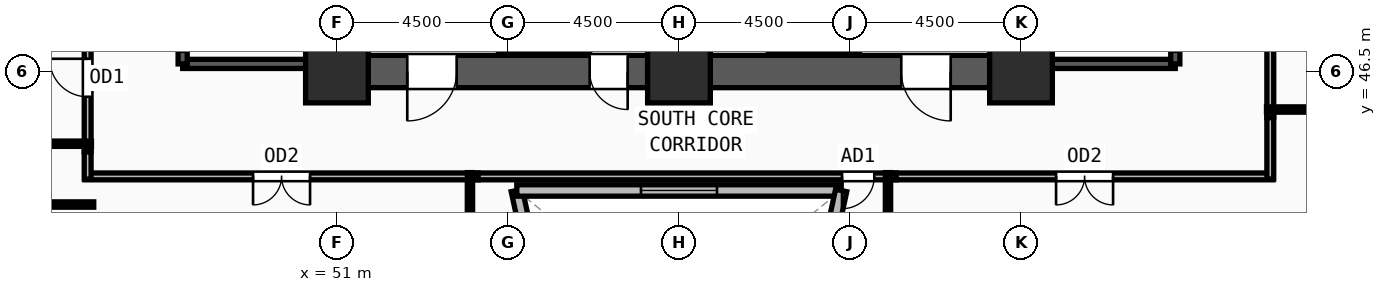
"""IFC4 building model, lengths in metres.
Left out: names, types, materials, properties, quantities, classifications, styles, units other than length and angle.
Written with IfcOpenShell. Run it as: python <this file> out.ifc"""

import sys

from ifc_helpers import new_model, si_unit, direction, frame, frame_2d, origin, origin_2d, place, context, subcontext, project, spatial, rectangle, extrude, source, transform, mapped, element, fill, save


model = new_model("IFC4")
c1 = context("Model", 3, precision=1e-05, world=origin(), true_north=direction((0.0, 1.0)))
c2 = subcontext(c1, "Body", "Model", "MODEL_VIEW")
j1 = project(units=[si_unit("LENGTHUNIT", "METRE"), si_unit("PLANEANGLEUNIT", "RADIAN")], contexts=[c1])
p1 = place(None, origin())
s1 = spatial("IfcSite", under=j1, at=p1, CompositionType="ELEMENT")
p2 = place(p1, origin())
s2 = spatial("IfcBuilding", under=s1, at=p2, CompositionType="ELEMENT")
p3 = place(p2, frame((0.0, 0.0, 74.25)))
s3 = spatial("IfcBuildingStorey", under=s2, at=p3, CompositionType="ELEMENT", Elevation=74.25)
m1 = source(origin(), c2, "Body", "SweptSolid", [
    extrude(rectangle(XDim=1.65, YDim=1.65, at=origin_2d()), origin(), (0.0, 0.0, 1.0), 3.75),
])
for number, where, z_axis, x_axis in (
    (1, (51.0, 46.5, 0.0), (0.0, 0.0, 1.0), (1.0, 0.0, 0.0)),
    (2, (60.0, 46.5, 0.0), (0.0, 0.0, 1.0), (1.0, 0.0, 0.0)),
    (3, (69.0, 46.5, 0.0), (0.0, 0.0, 1.0), (1.0, 0.0, 0.0)),
):
    element("IfcColumn", number, at=place(p3, frame(where, z_axis=z_axis, x_axis=x_axis)), inside=s3, PredefinedType="COLUMN", context=c2, shape_type="MappedRepresentation", body=[
        mapped(m1, transform((0.0, 0.0, 0.0), x_axis=(1.0, 0.0, 0.0), y_axis=(0.0, 1.0, 0.0), z_axis=(0.0, 0.0, 1.0), scale=1.0)),
    ])
p4 = place(p3, frame((68.175, 46.5, 0.0), z_axis=(0.0, 0.0, 1.0), x_axis=(-1.0, 0.0, 0.0)))
e4 = element("IfcWall", 4, at=p4, inside=s3, PredefinedType="SHEAR", context=c2, shape_type="SweptSolid", body=[
    extrude(rectangle(XDim=7.35, YDim=0.85, at=frame_2d((3.675, 0.0))), origin(), (0.0, 0.0, 1.0), 3.57),
])
m2 = source(origin(), c2, "Body", "SweptSolid", [
    extrude(rectangle(XDim=1.3, YDim=2.2, at=frame_2d((0.65, 1.1))), frame((0.0, 0.435, 0.0), z_axis=(0.0, -1.0, 0.0), x_axis=(1.0, 0.0, 0.0)), (0.0, 0.0, 1.0), 0.87),
])
p5 = place(p4, frame((1.025, 0.0, 0.0)))
e5 = element("IfcOpeningElement", 5, at=p5, cuts=e4, PredefinedType="OPENING", context=c2, shape_type="MappedRepresentation", body=[
    mapped(m2, transform((0.0, 0.0, 0.0), x_axis=(1.0, 0.0, 0.0), y_axis=(0.0, 1.0, 0.0), z_axis=(0.0, 0.0, 1.0), scale=1.0)),
])
p6 = place(p3, frame((59.175, 46.5, 0.0), z_axis=(0.0, 0.0, 1.0), x_axis=(-1.0, 0.0, 0.0)))
e6 = element("IfcWall", 6, at=p6, inside=s3, PredefinedType="SHEAR", context=c2, shape_type="SweptSolid", body=[
    extrude(rectangle(XDim=7.35, YDim=0.85, at=frame_2d((3.675, 0.0))), origin(), (0.0, 0.0, 1.0), 3.57),
])
p7 = place(p6, frame((5.025, 0.0, 0.0)))
e7 = element("IfcOpeningElement", 7, at=p7, cuts=e6, PredefinedType="OPENING", context=c2, shape_type="MappedRepresentation", body=[
    mapped(m2, transform((0.0, 0.0, 0.0), x_axis=(1.0, 0.0, 0.0), y_axis=(0.0, 1.0, 0.0), z_axis=(0.0, 0.0, 1.0), scale=1.0)),
])
m3 = source(origin(), c2, "Body", "SweptSolid", [
    extrude(rectangle(XDim=1.0, YDim=2.2, at=frame_2d((0.5, 1.1))), frame((0.0, 0.435, 0.0), z_axis=(0.0, -1.0, 0.0), x_axis=(1.0, 0.0, 0.0)), (0.0, 0.0, 1.0), 0.87),
])
p8 = place(p6, frame((0.525, 0.0, 0.0)))
e8 = element("IfcOpeningElement", 8, at=p8, cuts=e6, PredefinedType="OPENING", context=c2, shape_type="MappedRepresentation", body=[
    mapped(m3, transform((0.0, 0.0, 0.0), x_axis=(1.0, 0.0, 0.0), y_axis=(0.0, 1.0, 0.0), z_axis=(0.0, 0.0, 1.0), scale=1.0)),
])
p9 = place(p3, frame((46.94, 46.7, 0.0), z_axis=(0.0, 0.0, 1.0), x_axis=(1.0, 0.0, 0.0)))
e9 = element("IfcWall", 9, at=p9, inside=s3, PredefinedType="SOLIDWALL", context=c2, shape_type="SweptSolid", body=[
    extrude(rectangle(XDim=3.44, YDim=0.24, at=frame_2d((1.72, 0.0))), origin(), (0.0, 0.0, 1.0), 3.57),
])
p10 = place(p3, frame((50.38, 46.7, 0.0), z_axis=(0.0, 0.0, 1.0), x_axis=(0.0, 1.0, 0.0)))
e10 = element("IfcWall", 10, at=p10, inside=s3, PredefinedType="SOLIDWALL", context=c2, shape_type="SweptSolid", body=[
    extrude(rectangle(XDim=7.82, YDim=0.24, at=frame_2d((3.91, 0.0))), origin(), (0.0, 0.0, 1.0), 3.57),
])
p11 = place(p3, frame((46.94, 54.52, 0.0), z_axis=(0.0, 0.0, 1.0), x_axis=(0.0, -1.0, 0.0)))
e11 = element("IfcWall", 11, at=p11, inside=s3, PredefinedType="SOLIDWALL", context=c2, shape_type="SweptSolid", body=[
    extrude(rectangle(XDim=7.82, YDim=0.24, at=frame_2d((3.91, 0.0))), origin(), (0.0, 0.0, 1.0), 3.57),
])
m4 = source(origin(), c2, "Body", "SweptSolid", [
    extrude(rectangle(XDim=1.2, YDim=2.2, at=frame_2d((0.6, 1.1))), frame((0.0, 0.13, 0.0), z_axis=(0.0, -1.0, 0.0), x_axis=(1.0, 0.0, 0.0)), (0.0, 0.0, 1.0), 0.26),
])
p12 = place(p11, frame((6.3, 0.0, 0.0)))
e12 = element("IfcOpeningElement", 12, at=p12, cuts=e11, PredefinedType="OPENING", context=c2, shape_type="MappedRepresentation", body=[
    mapped(m4, transform((0.0, 0.0, 0.0), x_axis=(1.0, 0.0, 0.0), y_axis=(0.0, 1.0, 0.0), z_axis=(0.0, 0.0, 1.0), scale=1.0)),
])
p13 = place(p3, frame((69.62, 46.7, 0.0), z_axis=(0.0, 0.0, 1.0), x_axis=(1.0, 0.0, 0.0)))
e13 = element("IfcWall", 13, at=p13, inside=s3, PredefinedType="SOLIDWALL", context=c2, shape_type="SweptSolid", body=[
    extrude(rectangle(XDim=3.44, YDim=0.24, at=frame_2d((1.72, 0.0))), origin(), (0.0, 0.0, 1.0), 3.57),
])
p14 = place(p3, frame((73.06, 46.7, 0.0), z_axis=(0.0, 0.0, 1.0), x_axis=(0.0, 1.0, 0.0)))
e14 = element("IfcWall", 14, at=p14, inside=s3, PredefinedType="SOLIDWALL", context=c2, shape_type="SweptSolid", body=[
    extrude(rectangle(XDim=7.82, YDim=0.24, at=frame_2d((3.91, 0.0))), origin(), (0.0, 0.0, 1.0), 3.57),
])
p15 = place(p14, frame((0.32, 0.0, 0.0)))
e15 = element("IfcOpeningElement", 15, at=p15, cuts=e14, PredefinedType="OPENING", context=c2, shape_type="MappedRepresentation", body=[
    mapped(m4, transform((0.0, 0.0, 0.0), x_axis=(1.0, 0.0, 0.0), y_axis=(0.0, 1.0, 0.0), z_axis=(0.0, 0.0, 1.0), scale=1.0)),
])
p16 = place(p3, frame((69.62, 54.52, 0.0), z_axis=(0.0, 0.0, 1.0), x_axis=(0.0, -1.0, 0.0)))
e16 = element("IfcWall", 16, at=p16, inside=s3, PredefinedType="SOLIDWALL", context=c2, shape_type="SweptSolid", body=[
    extrude(rectangle(XDim=7.82, YDim=0.24, at=frame_2d((3.91, 0.0))), origin(), (0.0, 0.0, 1.0), 3.57),
])
p17 = place(p3, frame((57.226, 36.461, 0.0), z_axis=(0.0, 0.0, 1.0), x_axis=(-0.211368462484, 0.977406452336, 0.0)))
e17 = element("IfcWall", 17, at=p17, inside=s3, PredefinedType="SOLIDWALL", context=c2, shape_type="SweptSolid", body=[
    extrude(rectangle(XDim=7.069, YDim=0.3, at=frame_2d((3.534, 0.0))), origin(), (0.0, 0.0, 1.0), 3.57),
])
m5 = source(origin(), c2, "Body", "SweptSolid", [
    extrude(rectangle(XDim=2.0, YDim=1.9, at=frame_2d((1.0, 0.95))), frame((0.0, 0.16, 0.0), z_axis=(0.0, -1.0, 0.0), x_axis=(1.0, 0.0, 0.0)), (0.0, 0.0, 1.0), 0.32),
])
p18 = place(p17, frame((2.534, 0.0, 0.55)))
e18 = element("IfcOpeningElement", 18, at=p18, cuts=e17, PredefinedType="OPENING", context=c2, shape_type="MappedRepresentation", body=[
    mapped(m5, transform((0.0, 0.0, 0.0), x_axis=(1.0, 0.0, 0.0), y_axis=(0.0, 1.0, 0.0), z_axis=(0.0, 0.0, 1.0), scale=1.0)),
])
p19 = place(p3, frame((55.732, 43.37, 0.0), z_axis=(0.0, 0.0, 1.0), x_axis=(1.0, 0.0, 0.0)))
e19 = element("IfcWall", 19, at=p19, inside=s3, PredefinedType="SOLIDWALL", context=c2, shape_type="SweptSolid", body=[
    extrude(rectangle(XDim=8.536, YDim=0.3, at=frame_2d((4.268, 0.0))), origin(), (0.0, 0.0, 1.0), 3.57),
])
p20 = place(p19, frame((3.268, 0.0, 0.55)))
e20 = element("IfcOpeningElement", 20, at=p20, cuts=e19, PredefinedType="OPENING", context=c2, shape_type="MappedRepresentation", body=[
    mapped(m5, transform((0.0, 0.0, 0.0), x_axis=(1.0, 0.0, 0.0), y_axis=(0.0, 1.0, 0.0), z_axis=(0.0, 0.0, 1.0), scale=1.0)),
])
p21 = place(p3, frame((64.268, 43.37, 0.0), z_axis=(0.0, 0.0, 1.0), x_axis=(-0.211368462484, -0.977406452336, 0.0)))
e21 = element("IfcWall", 21, at=p21, inside=s3, PredefinedType="SOLIDWALL", context=c2, shape_type="SweptSolid", body=[
    extrude(rectangle(XDim=7.069, YDim=0.3, at=frame_2d((3.534, 0.0))), origin(), (0.0, 0.0, 1.0), 3.57),
])
p22 = place(p21, frame((2.534, 0.0, 0.55)))
e22 = element("IfcOpeningElement", 22, at=p22, cuts=e21, PredefinedType="OPENING", context=c2, shape_type="MappedRepresentation", body=[
    mapped(m5, transform((0.0, 0.0, 0.0), x_axis=(1.0, 0.0, 0.0), y_axis=(0.0, 1.0, 0.0), z_axis=(0.0, 0.0, 1.0), scale=1.0)),
])
p23 = place(p3, frame((44.44, 44.385, 0.0), z_axis=(0.0, 0.0, 1.0), x_axis=(0.0, 1.0, 0.0)))
e23 = element("IfcWall", 23, at=p23, inside=s3, PredefinedType="PARTITIONING", context=c2, shape_type="SweptSolid", body=[
    extrude(rectangle(XDim=3.9, YDim=0.18, at=frame_2d((1.95, 0.0))), origin(), (0.0, 0.0, 1.0), 3.57),
])
m6 = source(origin(), c2, "Body", "SweptSolid", [
    extrude(rectangle(XDim=1.0, YDim=2.2, at=frame_2d((0.5, 1.1))), frame((0.0, 0.1, 0.0), z_axis=(0.0, -1.0, 0.0), x_axis=(1.0, 0.0, 0.0)), (0.0, 0.0, 1.0), 0.2),
])
p24 = place(p23, frame((1.45, 0.0, 0.0)))
e24 = element("IfcOpeningElement", 24, at=p24, cuts=e23, PredefinedType="OPENING", context=c2, shape_type="MappedRepresentation", body=[
    mapped(m6, transform((0.0, 0.0, 0.0), x_axis=(1.0, 0.0, 0.0), y_axis=(0.0, 1.0, 0.0), z_axis=(0.0, 0.0, 1.0), scale=1.0)),
])
p25 = place(p3, frame((54.715, 43.74, 0.0), z_axis=(0.0, 0.0, 1.0), x_axis=(-1.0, 0.0, 0.0)))
e25 = element("IfcWall", 25, at=p25, inside=s3, PredefinedType="PARTITIONING", context=c2, shape_type="SweptSolid", body=[
    extrude(rectangle(XDim=10.345, YDim=0.18, at=frame_2d((5.172, 0.0))), origin(), (0.0, 0.0, 1.0), 3.57),
])
m7 = source(origin(), c2, "Body", "SweptSolid", [
    extrude(rectangle(XDim=1.5, YDim=2.2, at=frame_2d((0.75, 1.1))), frame((0.0, 0.1, 0.0), z_axis=(0.0, -1.0, 0.0), x_axis=(1.0, 0.0, 0.0)), (0.0, 0.0, 1.0), 0.2),
])
p26 = place(p25, frame((4.423, 0.0, 0.0)))
e26 = element("IfcOpeningElement", 26, at=p26, cuts=e25, PredefinedType="OPENING", context=c2, shape_type="MappedRepresentation", body=[
    mapped(m7, transform((0.0, 0.0, 0.0), x_axis=(1.0, 0.0, 0.0), y_axis=(0.0, 1.0, 0.0), z_axis=(0.0, 0.0, 1.0), scale=1.0)),
])
p27 = place(p3, frame((65.715, 43.74, 0.0), z_axis=(0.0, 0.0, 1.0), x_axis=(-1.0, 0.0, 0.0)))
e27 = element("IfcWall", 27, at=p27, inside=s3, PredefinedType="PARTITIONING", context=c2, shape_type="SweptSolid", body=[
    extrude(rectangle(XDim=11.0, YDim=0.18, at=frame_2d((5.5, 0.0))), origin(), (0.0, 0.0, 1.0), 3.57),
])
m8 = source(origin(), c2, "Body", "SweptSolid", [
    extrude(rectangle(XDim=0.85, YDim=2.1, at=frame_2d((0.425, 1.05))), frame((0.0, 0.1, 0.0), z_axis=(0.0, -1.0, 0.0), x_axis=(1.0, 0.0, 0.0)), (0.0, 0.0, 1.0), 0.2),
])
p28 = place(p27, frame((0.575, 0.0, 0.0)))
e28 = element("IfcOpeningElement", 28, at=p28, cuts=e27, PredefinedType="OPENING", context=c2, shape_type="MappedRepresentation", body=[
    mapped(m8, transform((0.0, 0.0, 0.0), x_axis=(1.0, 0.0, 0.0), y_axis=(0.0, 1.0, 0.0), z_axis=(0.0, 0.0, 1.0), scale=1.0)),
])
p29 = place(p3, frame((75.63, 43.74, 0.0), z_axis=(0.0, 0.0, 1.0), x_axis=(-1.0, 0.0, 0.0)))
e29 = element("IfcWall", 29, at=p29, inside=s3, PredefinedType="PARTITIONING", context=c2, shape_type="SweptSolid", body=[
    extrude(rectangle(XDim=9.915, YDim=0.18, at=frame_2d((4.958, 0.0))), origin(), (0.0, 0.0, 1.0), 3.57),
])
p30 = place(p29, frame((4.207, 0.0, 0.0)))
e30 = element("IfcOpeningElement", 30, at=p30, cuts=e29, PredefinedType="OPENING", context=c2, shape_type="MappedRepresentation", body=[
    mapped(m7, transform((0.0, 0.0, 0.0), x_axis=(1.0, 0.0, 0.0), y_axis=(0.0, 1.0, 0.0), z_axis=(0.0, 0.0, 1.0), scale=1.0)),
])
p31 = place(p3, frame((75.56, 50.785, 0.0), z_axis=(0.0, 0.0, 1.0), x_axis=(0.0, -1.0, 0.0)))
e31 = element("IfcWall", 31, at=p31, inside=s3, PredefinedType="PARTITIONING", context=c2, shape_type="SweptSolid", body=[
    extrude(rectangle(XDim=5.5, YDim=0.18, at=frame_2d((2.75, 0.0))), origin(), (0.0, 0.0, 1.0), 3.57),
])
p32 = place(p31, frame((2.25, 0.0, 0.0)))
e32 = element("IfcOpeningElement", 32, at=p32, cuts=e31, PredefinedType="OPENING", context=c2, shape_type="MappedRepresentation", body=[
    mapped(m6, transform((0.0, 0.0, 0.0), x_axis=(1.0, 0.0, 0.0), y_axis=(0.0, 1.0, 0.0), z_axis=(0.0, 0.0, 1.0), scale=1.0)),
])
p33 = place(p3, frame((44.44, 43.67, 0.0), z_axis=(0.0, 0.0, 1.0), x_axis=(0.0, 1.0, 0.0)))
e33 = element("IfcWall", 33, at=p33, inside=s3, PredefinedType="PARTITIONING", context=c2, shape_type="SweptSolid", body=[
    extrude(rectangle(XDim=0.715, YDim=0.18, at=frame_2d((0.357, 0.0))), origin(), (0.0, 0.0, 1.0), 3.57),
])
p34 = place(p3, frame((75.56, 45.285, 0.0), z_axis=(0.0, 0.0, 1.0), x_axis=(0.0, -1.0, 0.0)))
e34 = element("IfcWall", 34, at=p34, inside=s3, PredefinedType="PARTITIONING", context=c2, shape_type="SweptSolid", body=[
    extrude(rectangle(XDim=1.615, YDim=0.18, at=frame_2d((0.808, 0.0))), origin(), (0.0, 0.0, 1.0), 3.57),
])
p35 = place(p3, frame((44.6, 43.0, 0.0), z_axis=(0.0, 0.0, 1.0), x_axis=(-1.0, 0.0, 0.0)))
e35 = element("IfcWall", 35, at=p35, inside=s3, PredefinedType="PARTITIONING", context=c2, shape_type="SweptSolid", body=[
    extrude(rectangle(XDim=10.232, YDim=0.14, at=frame_2d((5.116, 0.0))), origin(), (0.0, 0.0, 1.0), 3.57),
])
p36 = place(p3, frame((44.54, 44.6, 0.0), z_axis=(0.0, 0.0, 1.0), x_axis=(-1.0, 0.0, 0.0)))
e36 = element("IfcWall", 36, at=p36, inside=s3, PredefinedType="PARTITIONING", context=c2, shape_type="SweptSolid", body=[
    extrude(rectangle(XDim=10.979, YDim=0.14, at=frame_2d((5.49, 0.0))), origin(), (0.0, 0.0, 1.0), 3.57),
])
p37 = place(p3, frame((75.46, 45.5, 0.0), z_axis=(0.0, 0.0, 1.0), x_axis=(1.0, 0.0, 0.0)))
e37 = element("IfcWall", 37, at=p37, inside=s3, PredefinedType="PARTITIONING", context=c2, shape_type="SweptSolid", body=[
    extrude(rectangle(XDim=11.759, YDim=0.14, at=frame_2d((5.879, 0.0))), origin(), (0.0, 0.0, 1.0), 3.57),
])
for number, where, z_axis, x_axis in (
    (38, (54.5, 43.84, 0.0), (0.0, 0.0, 1.0), (0.0, -1.0, 0.0)),
    (39, (65.5, 43.84, 0.0), (0.0, 0.0, 1.0), (0.0, -1.0, 0.0)),
):
    element("IfcWall", number, at=place(p3, frame(where, z_axis=z_axis, x_axis=x_axis)), inside=s3, PredefinedType="PARTITIONING", context=c2, shape_type="SweptSolid", body=[
        extrude(rectangle(XDim=30.469, YDim=0.14, at=frame_2d((15.234, 0.0))), origin(), (0.0, 0.0, 1.0), 3.57),
    ])
m9 = source(origin(), c2, "Body", "SweptSolid", [
    extrude(rectangle(XDim=1.3, YDim=2.2, at=frame_2d((0.65, 1.1))), frame((0.0, 0.025, 0.0), z_axis=(0.0, -1.0, 0.0), x_axis=(1.0, 0.0, 0.0)), (0.0, 0.0, 1.0), 0.05),
])
p38 = place(p7, origin())
e40 = element("IfcDoor", 40, at=p38, inside=s3, OperationType="SINGLE_SWING_RIGHT", PredefinedType="DOOR", context=c2, shape_type="MappedRepresentation", body=[
    mapped(m9, transform((0.0, 0.0, 0.0), x_axis=(1.0, 0.0, 0.0), y_axis=(0.0, 1.0, 0.0), z_axis=(0.0, 0.0, 1.0), scale=1.0)),
])
fill(e7, e40)
m10 = source(origin(), c2, "Body", "SweptSolid", [
    extrude(rectangle(XDim=1.0, YDim=2.2, at=frame_2d((0.5, 1.1))), frame((0.0, 0.025, 0.0), z_axis=(0.0, -1.0, 0.0), x_axis=(1.0, 0.0, 0.0)), (0.0, 0.0, 1.0), 0.05),
])
p39 = place(p8, origin())
e41 = element("IfcDoor", 41, at=p39, inside=s3, OperationType="SINGLE_SWING_LEFT", PredefinedType="DOOR", context=c2, shape_type="MappedRepresentation", body=[
    mapped(m10, transform((0.0, 0.0, 0.0), x_axis=(1.0, 0.0, 0.0), y_axis=(0.0, 1.0, 0.0), z_axis=(0.0, 0.0, 1.0), scale=1.0)),
])
fill(e8, e41)
p40 = place(p5, origin())
e42 = element("IfcDoor", 42, at=p40, inside=s3, OperationType="SINGLE_SWING_LEFT", PredefinedType="DOOR", context=c2, shape_type="MappedRepresentation", body=[
    mapped(m9, transform((0.0, 0.0, 0.0), x_axis=(1.0, 0.0, 0.0), y_axis=(0.0, 1.0, 0.0), z_axis=(0.0, 0.0, 1.0), scale=1.0)),
])
fill(e5, e42)
m11 = source(origin(), c2, "Body", "SweptSolid", [
    extrude(rectangle(XDim=2.0, YDim=1.9, at=frame_2d((1.0, 0.95))), frame((0.0, 0.03, 0.0), z_axis=(0.0, -1.0, 0.0), x_axis=(1.0, 0.0, 0.0)), (0.0, 0.0, 1.0), 0.06),
])
p41 = place(p20, origin())
e43 = element("IfcWindow", 43, at=p41, inside=s3, PartitioningType="DOUBLE_PANEL_VERTICAL", PredefinedType="WINDOW", context=c2, shape_type="MappedRepresentation", body=[
    mapped(m11, transform((0.0, 0.0, 0.0), x_axis=(1.0, 0.0, 0.0), y_axis=(0.0, 1.0, 0.0), z_axis=(0.0, 0.0, 1.0), scale=1.0)),
])
fill(e20, e43)
p42 = place(p24, origin())
e44 = element("IfcDoor", 44, at=p42, inside=s3, OperationType="SINGLE_SWING_RIGHT", PredefinedType="DOOR", context=c2, shape_type="MappedRepresentation", body=[
    mapped(m10, transform((0.0, 0.0, 0.0), x_axis=(1.0, 0.0, 0.0), y_axis=(0.0, 1.0, 0.0), z_axis=(0.0, 0.0, 1.0), scale=1.0)),
])
fill(e24, e44)
m12 = source(origin(), c2, "Body", "SweptSolid", [
    extrude(rectangle(XDim=1.5, YDim=2.2, at=frame_2d((0.75, 1.1))), frame((0.0, 0.025, 0.0), z_axis=(0.0, -1.0, 0.0), x_axis=(1.0, 0.0, 0.0)), (0.0, 0.0, 1.0), 0.05),
])
p43 = place(p26, origin())
e45 = element("IfcDoor", 45, at=p43, inside=s3, OperationType="DOUBLE_DOOR_SINGLE_SWING", PredefinedType="DOOR", context=c2, shape_type="MappedRepresentation", body=[
    mapped(m12, transform((0.0, 0.0, 0.0), x_axis=(1.0, 0.0, 0.0), y_axis=(0.0, 1.0, 0.0), z_axis=(0.0, 0.0, 1.0), scale=1.0)),
])
fill(e26, e45)
m13 = source(origin(), c2, "Body", "SweptSolid", [
    extrude(rectangle(XDim=0.85, YDim=2.1, at=frame_2d((0.425, 1.05))), frame((0.0, 0.025, 0.0), z_axis=(0.0, -1.0, 0.0), x_axis=(1.0, 0.0, 0.0)), (0.0, 0.0, 1.0), 0.05),
])
p44 = place(p28, origin())
e46 = element("IfcDoor", 46, at=p44, inside=s3, OperationType="SINGLE_SWING_RIGHT", PredefinedType="DOOR", context=c2, shape_type="MappedRepresentation", body=[
    mapped(m13, transform((0.0, 0.0, 0.0), x_axis=(1.0, 0.0, 0.0), y_axis=(0.0, 1.0, 0.0), z_axis=(0.0, 0.0, 1.0), scale=1.0)),
])
fill(e28, e46)
p45 = place(p30, origin())
e47 = element("IfcDoor", 47, at=p45, inside=s3, OperationType="DOUBLE_DOOR_SINGLE_SWING", PredefinedType="DOOR", context=c2, shape_type="MappedRepresentation", body=[
    mapped(m12, transform((0.0, 0.0, 0.0), x_axis=(1.0, 0.0, 0.0), y_axis=(0.0, 1.0, 0.0), z_axis=(0.0, 0.0, 1.0), scale=1.0)),
])
fill(e30, e47)
save(model, sys.argv[1])
